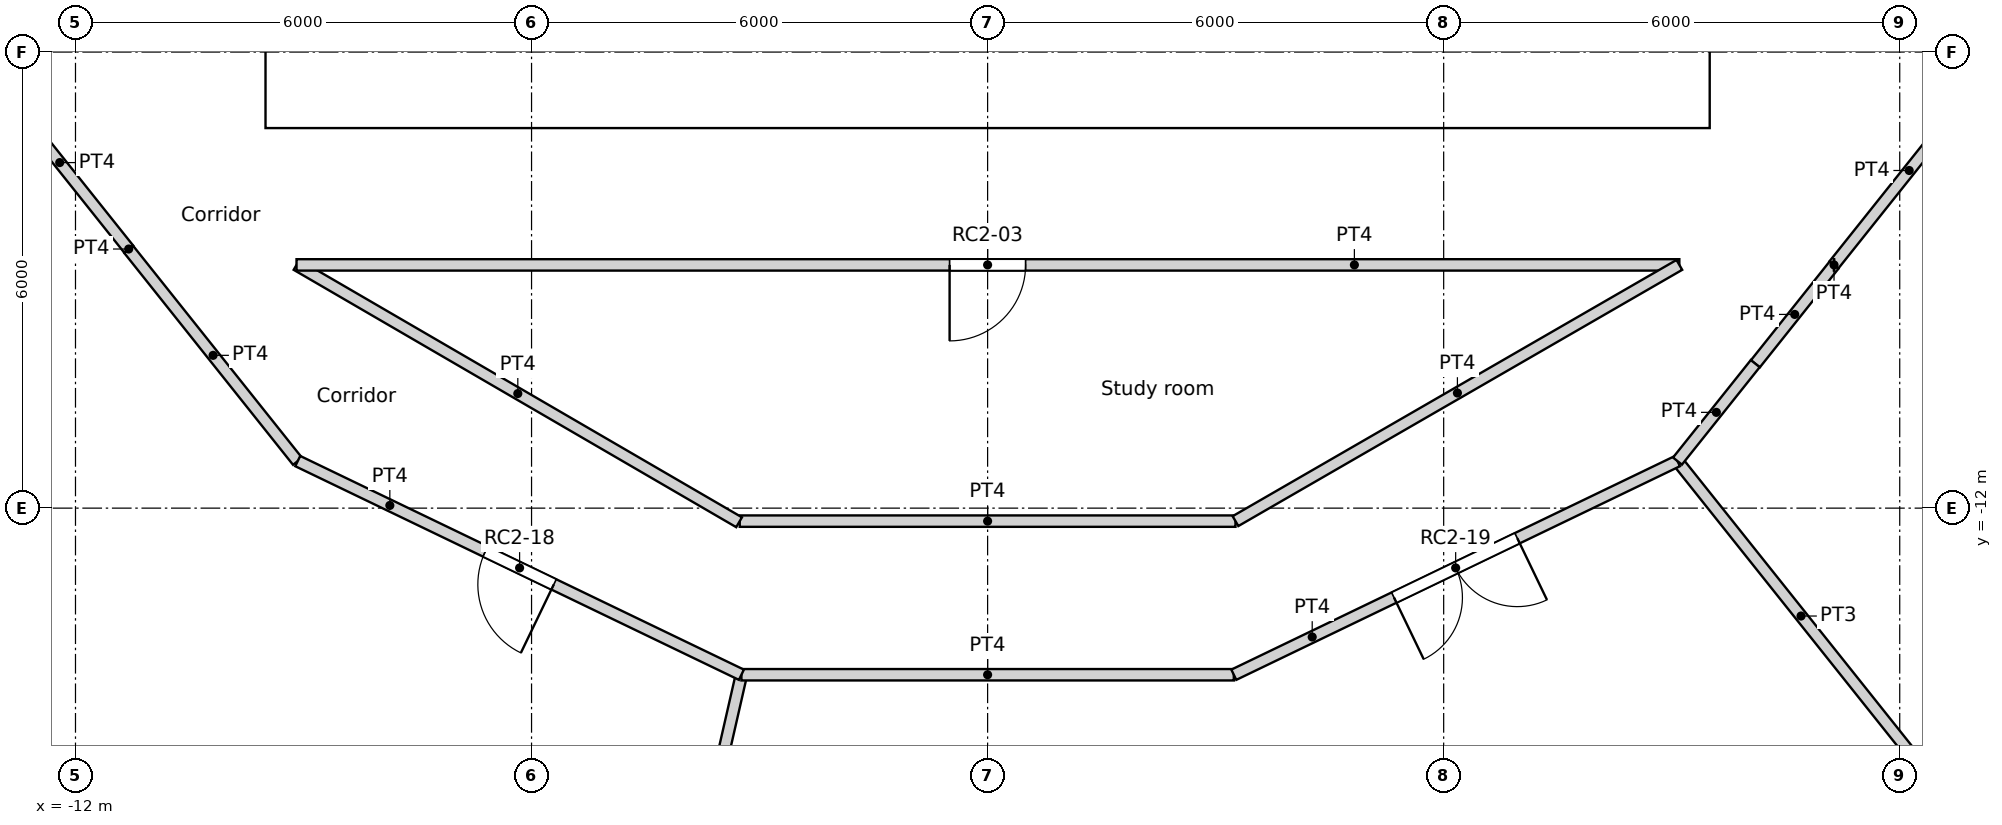
"""IFC4 building model, lengths in metres.
Left out: names, types, materials, properties, quantities, classifications, styles, units other than length and angle.
Written with IfcOpenShell. Run it as: python <this file> out.ifc"""

import sys

from ifc_helpers import new_model, si_unit, direction, frame, frame_2d, origin, origin_2d, place, context, subcontext, project, spatial, rectangle, circle, extrude, element, fill, save


model = new_model("IFC4")
c1 = context("Model", 3, precision=1e-05, world=origin(), true_north=direction((0.0, 1.0)))
c2 = subcontext(c1, "Body", "Model", "MODEL_VIEW")
j1 = project(units=[si_unit("LENGTHUNIT", "METRE"), si_unit("PLANEANGLEUNIT", "RADIAN")], contexts=[c1])
p1 = place(None, origin())
s1 = spatial("IfcSite", under=j1, at=p1, CompositionType="ELEMENT")
p2 = place(p1, origin())
s2 = spatial("IfcBuilding", under=s1, at=p2, CompositionType="ELEMENT")
p3 = place(p2, frame((0.0, 0.0, 241.8)))
s3 = spatial("IfcBuildingStorey", under=s2, at=p3, CompositionType="ELEMENT", Elevation=241.8)
p4 = place(p3, frame((11.735, -14.716, 0.0), z_axis=(0.0, 0.0, 1.0), x_axis=(1.0, 0.0, 0.0)))
e1 = element("IfcColumn", 1, at=p4, inside=s3, PredefinedType="COLUMN", context=c2, shape_type="SweptSolid", body=[
    extrude(circle(Radius=0.55, at=origin_2d()), origin(), (0.0, 0.0, 1.0), 3.6),
])
p5 = place(p3, frame((-9.5, -6.7, 0.0), z_axis=(0.0, 0.0, 1.0), x_axis=(1.0, 0.0, 0.0)))
e2 = element("IfcWall", 2, at=p5, inside=s3, PredefinedType="SOLIDWALL", context=c2, shape_type="SweptSolid", body=[
    extrude(rectangle(XDim=19.0, YDim=0.6, at=frame_2d((9.5, 0.0))), origin(), (0.0, 0.0, 1.0), 3.6),
])
p6 = place(p5, frame((10.4, 0.0, 0.0)))
e3 = element("IfcOpeningElement", 3, at=p6, cuts=e2, PredefinedType="OPENING", context=c2, shape_type="SweptSolid", body=[
    extrude(rectangle(XDim=1.0, YDim=2.1, at=frame_2d((0.5, 1.05))), frame((0.0, 0.3, 0.0), z_axis=(0.0, -1.0, 0.0), x_axis=(1.0, 0.0, 0.0)), (0.0, 0.0, 1.0), 0.6),
])
p7 = place(p5, frame((5.35, 0.0, 0.0)))
e4 = element("IfcOpeningElement", 4, at=p7, cuts=e2, PredefinedType="OPENING", context=c2, shape_type="SweptSolid", body=[
    extrude(rectangle(XDim=1.7, YDim=2.1, at=frame_2d((0.85, 1.05))), frame((0.0, 0.3, 0.0), z_axis=(0.0, -1.0, 0.0), x_axis=(1.0, 0.0, 0.0)), (0.0, 0.0, 1.0), 0.6),
])
p8 = place(p5, frame((11.95, 0.0, 0.0)))
e5 = element("IfcOpeningElement", 5, at=p8, cuts=e2, PredefinedType="OPENING", context=c2, shape_type="SweptSolid", body=[
    extrude(rectangle(XDim=1.7, YDim=2.1, at=frame_2d((0.85, 1.05))), frame((0.0, 0.3, 0.0), z_axis=(0.0, -1.0, 0.0), x_axis=(1.0, 0.0, 0.0)), (0.0, 0.0, 1.0), 0.6),
])
p9 = place(p3, frame((-9.2, -6.4, 0.0), z_axis=(0.0, 0.0, 1.0), x_axis=(0.0, 1.0, 0.0)))
e6 = element("IfcWall", 6, at=p9, inside=s3, PredefinedType="SOLIDWALL", context=c2, shape_type="SweptSolid", body=[
    extrude(rectangle(XDim=12.8, YDim=0.6, at=frame_2d((6.4, 0.0))), origin(), (0.0, 0.0, 1.0), 3.6),
])
p10 = place(p3, frame((9.2, -6.4, 0.0), z_axis=(0.0, 0.0, 1.0), x_axis=(0.0, 1.0, 0.0)))
e7 = element("IfcWall", 7, at=p10, inside=s3, PredefinedType="SOLIDWALL", context=c2, shape_type="SweptSolid", body=[
    extrude(rectangle(XDim=12.8, YDim=0.6, at=frame_2d((6.4, 0.0))), origin(), (0.0, 0.0, 1.0), 3.6),
])
p11 = place(p10, frame((6.4, 0.0, 0.0)))
e8 = element("IfcOpeningElement", 8, at=p11, cuts=e7, PredefinedType="OPENING", context=c2, shape_type="SweptSolid", body=[
    extrude(rectangle(XDim=1.8, YDim=2.1, at=frame_2d((0.9, 1.05))), frame((0.0, 0.3, 0.0), z_axis=(0.0, -1.0, 0.0), x_axis=(1.0, 0.0, 0.0)), (0.0, 0.0, 1.0), 0.6),
])
for number, where, z_axis, x_axis in (
    (9, (-2.25, -6.4, 0.0), (0.0, 0.0, 1.0), (0.0, 1.0, 0.0)),
    (10, (0.55, -6.4, 0.0), (0.0, 0.0, 1.0), (0.0, 1.0, 0.0)),
    (11, (2.25, -6.4, 0.0), (0.0, 0.0, 1.0), (0.0, 1.0, 0.0)),
):
    element("IfcWall", number, at=place(p3, frame(where, z_axis=z_axis, x_axis=x_axis)), inside=s3, PredefinedType="SOLIDWALL", context=c2, shape_type="SweptSolid", body=[
        extrude(rectangle(XDim=3.15, YDim=0.3, at=frame_2d((1.575, 0.0))), origin(), (0.0, 0.0, 1.0), 3.25),
    ])
p12 = place(p3, frame((-9.092, -8.8, 0.0), z_axis=(0.0, 0.0, 1.0), x_axis=(1.0, 0.0, 0.0)))
e12 = element("IfcWall", 12, at=p12, inside=s3, PredefinedType="PARTITIONING", context=c2, shape_type="SweptSolid", body=[
    extrude(rectangle(XDim=18.193, YDim=0.15, at=frame_2d((9.096, 0.0))), origin(), (0.0, 0.0, 1.0), 3.25),
])
p13 = place(p12, frame((8.592, 0.0, 0.0)))
e13 = element("IfcOpeningElement", 13, at=p13, cuts=e12, PredefinedType="OPENING", context=c2, shape_type="SweptSolid", body=[
    extrude(rectangle(XDim=1.0, YDim=2.04, at=frame_2d((0.5, 1.02))), frame((0.0, 0.075, 0.0), z_axis=(0.0, -1.0, 0.0), x_axis=(1.0, 0.0, 0.0)), (0.0, 0.0, 1.0), 0.15),
])
p14 = place(p3, frame((-9.092, -8.8, 0.0), z_axis=(0.0, 0.0, 1.0), x_axis=(0.864470922103, -0.502682827277, 0.0)))
e14 = element("IfcWall", 14, at=p14, inside=s3, PredefinedType="PARTITIONING", context=c2, shape_type="SweptSolid", body=[
    extrude(rectangle(XDim=6.735, YDim=0.15, at=frame_2d((3.368, 0.0))), origin(), (0.0, 0.0, 1.0), 3.25),
])
p15 = place(p3, frame((-11.3, -8.596, 0.0), z_axis=(0.0, 0.0, 1.0), x_axis=(0.623165080354, -0.782090328944, 0.0)))
e15 = element("IfcWall", 15, at=p15, inside=s3, PredefinedType="PARTITIONING", context=c2, shape_type="SweptSolid", body=[
    extrude(rectangle(XDim=3.564, YDim=0.15, at=frame_2d((1.782, 0.0))), origin(), (0.0, 0.0, 1.0), 3.25),
])
p16 = place(p3, frame((-11.3, -8.596, 0.0), z_axis=(0.0, 0.0, 1.0), x_axis=(0.0, 1.0, 0.0)))
e16 = element("IfcWall", 16, at=p16, inside=s3, PredefinedType="PARTITIONING", context=c2, shape_type="SweptSolid", body=[
    extrude(rectangle(XDim=0.01, YDim=0.15, at=frame_2d((0.005, 0.0))), origin(), (0.0, 0.0, 1.0), 3.25),
])
p17 = place(p3, frame((11.137, -8.8, 0.0), z_axis=(0.0, 0.0, 1.0), x_axis=(-1.0, 0.0, 0.0)))
e17 = element("IfcWall", 17, at=p17, inside=s3, PredefinedType="PARTITIONING", context=c2, shape_type="SweptSolid", body=[
    extrude(rectangle(XDim=0.003, YDim=0.15, at=frame_2d((0.001, 0.0))), origin(), (0.0, 0.0, 1.0), 3.25),
])
p18 = place(p3, frame((10.101, -10.101, 0.0), z_axis=(0.0, 0.0, 1.0), x_axis=(0.623098344652, 0.782143498913, 0.0)))
e18 = element("IfcWall", 18, at=p18, inside=s3, PredefinedType="PARTITIONING", context=c2, shape_type="SweptSolid", body=[
    extrude(rectangle(XDim=1.661, YDim=0.15, at=frame_2d((0.831, 0.0))), origin(), (0.0, 0.0, 1.0), 3.25),
])
p19 = place(p3, frame((11.134, -8.8, 0.0), z_axis=(0.0, 0.0, 1.0), x_axis=(0.623476099415, 0.781842409606, 0.0)))
e19 = element("IfcWall", 19, at=p19, inside=s3, PredefinedType="PARTITIONING", context=c2, shape_type="SweptSolid", body=[
    extrude(rectangle(XDim=3.177, YDim=0.15, at=frame_2d((1.589, 0.0))), origin(), (0.0, 0.0, 1.0), 3.25),
])
p20 = place(p3, frame((-13.115, -6.316, 0.0), z_axis=(0.0, 0.0, 1.0), x_axis=(0.623446514299, -0.781866001185, 0.0)))
e20 = element("IfcWall", 20, at=p20, inside=s3, PredefinedType="PARTITIONING", context=c2, shape_type="SweptSolid", body=[
    extrude(rectangle(XDim=2.911, YDim=0.15, at=frame_2d((1.456, 0.0))), origin(), (0.0, 0.0, 1.0), 3.25),
])
p21 = place(p3, frame((-3.261, -12.171, 0.0), z_axis=(0.0, 0.0, 1.0), x_axis=(1.0, 0.0, 0.0)))
e21 = element("IfcWall", 21, at=p21, inside=s3, PredefinedType="PARTITIONING", context=c2, shape_type="SweptSolid", body=[
    extrude(rectangle(XDim=6.522, YDim=0.15, at=frame_2d((3.261, 0.0))), origin(), (0.0, 0.0, 1.0), 3.25),
])
p22 = place(p3, frame((3.261, -12.171, 0.0), z_axis=(0.0, 0.0, 1.0), x_axis=(0.866066809554, 0.499928276245, 0.0)))
e22 = element("IfcWall", 22, at=p22, inside=s3, PredefinedType="PARTITIONING", context=c2, shape_type="SweptSolid", body=[
    extrude(rectangle(XDim=6.743, YDim=0.15, at=frame_2d((3.371, 0.0))), origin(), (0.0, 0.0, 1.0), 3.25),
])
p23 = place(p3, frame((-9.076, -11.381, 0.0), z_axis=(0.0, 0.0, 1.0), x_axis=(0.900976027191, -0.433868872388, 0.0)))
e23 = element("IfcWall", 23, at=p23, inside=s3, PredefinedType="PARTITIONING", context=c2, shape_type="SweptSolid", body=[
    extrude(rectangle(XDim=6.479, YDim=0.15, at=frame_2d((3.239, 0.0))), origin(), (0.0, 0.0, 1.0), 3.25),
])
p24 = place(p23, frame((2.74, 0.0, 0.0)))
e24 = element("IfcOpeningElement", 24, at=p24, cuts=e23, PredefinedType="OPENING", context=c2, shape_type="SweptSolid", body=[
    extrude(rectangle(XDim=1.0, YDim=2.04, at=frame_2d((0.5, 1.02))), frame((0.0, 0.075, 0.0), z_axis=(0.0, -1.0, 0.0), x_axis=(1.0, 0.0, 0.0)), (0.0, 0.0, 1.0), 0.15),
])
p25 = place(p3, frame((3.239, -14.192, 0.0), z_axis=(0.0, 0.0, 1.0), x_axis=(0.900976027191, 0.433868872388, 0.0)))
e25 = element("IfcWall", 25, at=p25, inside=s3, PredefinedType="PARTITIONING", context=c2, shape_type="SweptSolid", body=[
    extrude(rectangle(XDim=6.479, YDim=0.15, at=frame_2d((3.239, 0.0))), origin(), (0.0, 0.0, 1.0), 3.25),
])
p26 = place(p25, frame((2.34, 0.0, 0.0)))
e26 = element("IfcOpeningElement", 26, at=p26, cuts=e25, PredefinedType="OPENING", context=c2, shape_type="SweptSolid", body=[
    extrude(rectangle(XDim=1.8, YDim=2.1, at=frame_2d((0.9, 1.05))), frame((0.0, 0.075, 0.0), z_axis=(0.0, -1.0, 0.0), x_axis=(1.0, 0.0, 0.0)), (0.0, 0.0, 1.0), 0.15),
])
p27 = place(p3, frame((-3.239, -14.192, 0.0), z_axis=(0.0, 0.0, 1.0), x_axis=(1.0, 0.0, 0.0)))
e27 = element("IfcWall", 27, at=p27, inside=s3, PredefinedType="PARTITIONING", context=c2, shape_type="SweptSolid", body=[
    extrude(rectangle(XDim=6.478, YDim=0.15, at=frame_2d((3.239, 0.0))), origin(), (0.0, 0.0, 1.0), 3.25),
])
p28 = place(p3, frame((9.076, -11.381, 0.0), z_axis=(0.0, 0.0, 1.0), x_axis=(0.623805208652, 0.781579849829, 0.0)))
e28 = element("IfcWall", 28, at=p28, inside=s3, PredefinedType="PARTITIONING", context=c2, shape_type="SweptSolid", body=[
    extrude(rectangle(XDim=1.64, YDim=0.15, at=frame_2d((0.82, 0.0))), origin(), (0.0, 0.0, 1.0), 3.25),
])
p29 = place(p3, frame((-4.4, -19.276, 0.0), z_axis=(0.0, 0.0, 1.0), x_axis=(0.222612505682, 0.974907007008, 0.0)))
e29 = element("IfcWall", 29, at=p29, inside=s3, PredefinedType="PARTITIONING", context=c2, shape_type="SweptSolid", body=[
    extrude(rectangle(XDim=5.215, YDim=0.15, at=frame_2d((2.607, 0.0))), origin(), (0.0, 0.0, 1.0), 3.25),
])
p30 = place(p3, frame((9.076, -11.381, 0.0), z_axis=(0.0, 0.0, 1.0), x_axis=(0.623460949534, -0.781854490558, 0.0)))
e30 = element("IfcWall", 30, at=p30, inside=s3, PredefinedType="PARTITIONING", context=c2, shape_type="SweptSolid", body=[
    extrude(rectangle(XDim=5.214, YDim=0.15, at=frame_2d((2.607, 0.0))), origin(), (0.0, 0.0, 1.0), 3.25),
])
p31 = place(p6, origin())
e31 = element("IfcDoor", 31, at=p31, inside=s3, OperationType="SINGLE_SWING_LEFT", PredefinedType="DOOR", context=c2, shape_type="SweptSolid", body=[
    extrude(rectangle(XDim=1.0, YDim=2.1, at=frame_2d((0.5, 1.05))), frame((0.0, 0.025, 0.0), z_axis=(0.0, -1.0, 0.0), x_axis=(1.0, 0.0, 0.0)), (0.0, 0.0, 1.0), 0.05),
])
fill(e3, e31)
p32 = place(p7, origin())
e32 = element("IfcDoor", 32, at=p32, inside=s3, OperationType="DOUBLE_DOOR_SINGLE_SWING", PredefinedType="DOOR", context=c2, shape_type="SweptSolid", body=[
    extrude(rectangle(XDim=1.7, YDim=2.1, at=frame_2d((0.85, 1.05))), frame((0.0, 0.025, 0.0), z_axis=(0.0, -1.0, 0.0), x_axis=(1.0, 0.0, 0.0)), (0.0, 0.0, 1.0), 0.05),
])
fill(e4, e32)
p33 = place(p8, origin())
e33 = element("IfcDoor", 33, at=p33, inside=s3, OperationType="DOUBLE_DOOR_SINGLE_SWING", PredefinedType="DOOR", context=c2, shape_type="SweptSolid", body=[
    extrude(rectangle(XDim=1.7, YDim=2.1, at=frame_2d((0.85, 1.05))), frame((0.0, 0.025, 0.0), z_axis=(0.0, -1.0, 0.0), x_axis=(1.0, 0.0, 0.0)), (0.0, 0.0, 1.0), 0.05),
])
fill(e5, e33)
p34 = place(p13, origin())
e34 = element("IfcDoor", 34, at=p34, inside=s3, OperationType="SINGLE_SWING_RIGHT", PredefinedType="DOOR", context=c2, shape_type="SweptSolid", body=[
    extrude(rectangle(XDim=1.0, YDim=2.04, at=frame_2d((0.5, 1.02))), frame((0.0, 0.025, 0.0), z_axis=(0.0, -1.0, 0.0), x_axis=(1.0, 0.0, 0.0)), (0.0, 0.0, 1.0), 0.05),
])
fill(e13, e34)
p35 = place(p24, origin())
e35 = element("IfcDoor", 35, at=p35, inside=s3, OperationType="SINGLE_SWING_LEFT", PredefinedType="DOOR", context=c2, shape_type="SweptSolid", body=[
    extrude(rectangle(XDim=1.0, YDim=2.04, at=frame_2d((0.5, 1.02))), frame((0.0, 0.025, 0.0), z_axis=(0.0, -1.0, 0.0), x_axis=(1.0, 0.0, 0.0)), (0.0, 0.0, 1.0), 0.05),
])
fill(e24, e35)
p36 = place(p26, origin())
e36 = element("IfcDoor", 36, at=p36, inside=s3, OperationType="DOUBLE_DOOR_SINGLE_SWING", PredefinedType="DOOR", context=c2, shape_type="SweptSolid", body=[
    extrude(rectangle(XDim=1.8, YDim=2.1, at=frame_2d((0.9, 1.05))), frame((0.0, 0.025, 0.0), z_axis=(0.0, -1.0, 0.0), x_axis=(1.0, 0.0, 0.0)), (0.0, 0.0, 1.0), 0.05),
])
fill(e26, e36)
save(model, sys.argv[1])
